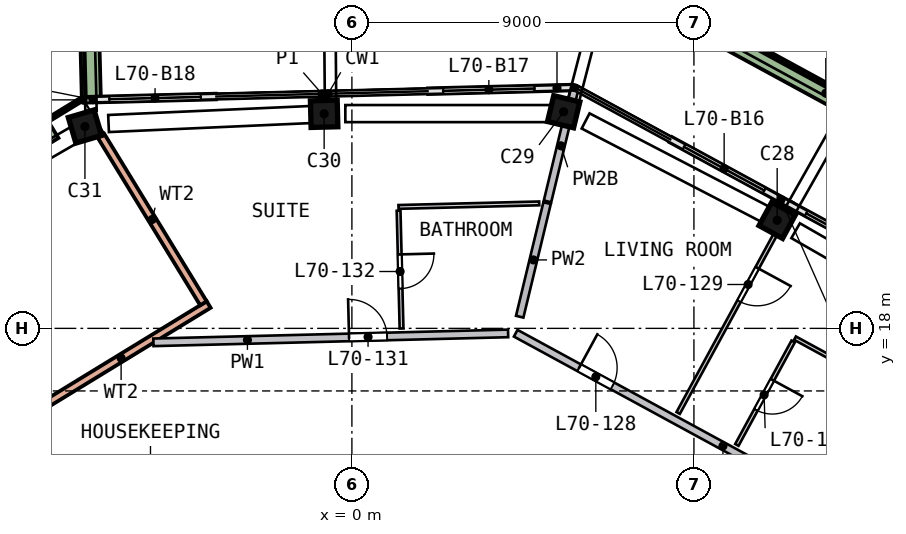
"""IFC4 building model, lengths in metres.
Left out: names, types, materials, properties, quantities, classifications, styles, units other than length and angle.
Written with IfcOpenShell. Run it as: python <this file> out.ifc"""

import sys

from ifc_helpers import new_model, si_unit, direction, frame, frame_2d, origin, origin_2d, place, context, subcontext, project, spatial, rectangle, extrude, element, fill, save


model = new_model("IFC4")
c1 = context("Model", 3, precision=1e-05, world=origin(), true_north=direction((0.0, 1.0)))
c2 = subcontext(c1, "Body", "Model", "MODEL_VIEW")
j1 = project(units=[si_unit("LENGTHUNIT", "METRE"), si_unit("PLANEANGLEUNIT", "RADIAN")], contexts=[c1])
p1 = place(None, origin())
s1 = spatial("IfcSite", under=j1, at=p1, CompositionType="ELEMENT")
p2 = place(p1, origin())
s2 = spatial("IfcBuilding", under=s1, at=p2, CompositionType="ELEMENT")
p3 = place(p2, frame((0.0, 0.0, 284.5)))
s3 = spatial("IfcBuildingStorey", under=s2, at=p3, CompositionType="ELEMENT", Elevation=284.5)
p4 = place(p3, frame((11.311, 20.78, 0.0), z_axis=(-0.099318662, 0.053005442, 0.993642907), x_axis=(-0.872612609, 0.475262413, -0.112573854)))
e1 = element("IfcColumn", 1, at=p4, inside=s3, PredefinedType="COLUMN", context=c2, shape_type="SweptSolid", body=[
    extrude(rectangle(XDim=0.7, YDim=0.7, at=origin_2d()), origin(), (0.0, 0.0, 1.0), 3.21),
])
p5 = place(p3, frame((5.709, 23.669, 0.0), z_axis=(-0.112812856, 0.026226708, 0.993270064), x_axis=(0.96552568, -0.233123432, 0.115817212)))
e2 = element("IfcColumn", 2, at=p5, inside=s3, PredefinedType="COLUMN", context=c2, shape_type="SweptSolid", body=[
    extrude(rectangle(XDim=0.7, YDim=0.7, at=origin_2d()), origin(), (0.0, 0.0, 1.0), 3.212),
])
p6 = place(p3, frame((-0.594, 23.651, 0.0), z_axis=(-0.112475484, -0.003726368, 0.993647513), x_axis=(-0.993346521, -0.024473849, -0.112533195)))
e3 = element("IfcColumn", 3, at=p6, inside=s3, PredefinedType="COLUMN", context=c2, shape_type="SweptSolid", body=[
    extrude(rectangle(XDim=0.7, YDim=0.7, at=origin_2d()), origin(), (0.0, 0.0, 1.0), 3.21),
])
p7 = place(p3, frame((-6.891, 23.353, 0.0), z_axis=(-0.110836116, -0.033676543, 0.993267963), x_axis=(0.952785536, 0.280681176, 0.115835227)))
e4 = element("IfcColumn", 4, at=p7, inside=s3, PredefinedType="COLUMN", context=c2, shape_type="SweptSolid", body=[
    extrude(rectangle(XDim=0.7, YDim=0.7, at=origin_2d()), origin(), (0.0, 0.0, 1.0), 3.212),
])
p8 = place(p3, frame((14.416, 19.687, 0.0), z_axis=(0.0, 0.0, 1.0), x_axis=(-0.878288574, 0.478130925, 0.0)))
e5 = element("IfcWall", 5, at=p8, inside=s3, PredefinedType="SOLIDWALL", context=c2, shape_type="SweptSolid", body=[
    extrude(rectangle(XDim=3.25, YDim=0.15, at=frame_2d((1.625, 0.0))), origin(), (0.0, 0.0, 1.0), 2.525),
])
p9 = place(p8, frame((0.4, 0.0, 0.0)))
e6 = element("IfcOpeningElement", 6, at=p9, cuts=e5, PredefinedType="OPENING", context=c2, shape_type="SweptSolid", body=[
    extrude(rectangle(XDim=2.4, YDim=2.4, at=frame_2d((1.2, 1.2))), frame((0.0, 0.085, 0.0), z_axis=(0.0, -1.0, 0.0), x_axis=(1.0, 0.0, 0.0)), (0.0, 0.0, 1.0), 0.17),
])
p10 = place(p3, frame((11.562, 21.241, 0.0), z_axis=(0.0, 0.0, 1.0), x_axis=(-0.878337007, 0.478041947, 0.0)))
e7 = element("IfcWall", 7, at=p10, inside=s3, PredefinedType="SOLIDWALL", context=c2, shape_type="SweptSolid", body=[
    extrude(rectangle(XDim=3.611, YDim=0.15, at=frame_2d((1.806, 0.0))), origin(), (0.0, 0.0, 1.0), 2.525),
])
p11 = place(p10, frame((0.811, 0.0, 0.0)))
e8 = element("IfcOpeningElement", 8, at=p11, cuts=e7, PredefinedType="OPENING", context=c2, shape_type="SweptSolid", body=[
    extrude(rectangle(XDim=2.4, YDim=2.4, at=frame_2d((1.2, 1.2))), frame((0.0, 0.085, 0.0), z_axis=(0.0, -1.0, 0.0), x_axis=(1.0, 0.0, 0.0)), (0.0, 0.0, 1.0), 0.17),
])
p12 = place(p3, frame((5.79, 24.336, 0.0), z_axis=(0.0, 0.0, 1.0), x_axis=(-0.999685428, -0.025080789, 0.0)))
e9 = element("IfcWall", 9, at=p12, inside=s3, PredefinedType="SOLIDWALL", context=c2, shape_type="SweptSolid", body=[
    extrude(rectangle(XDim=3.787, YDim=0.15, at=frame_2d((1.893, 0.0))), origin(), (0.0, 0.0, 1.0), 2.525),
])
p13 = place(p12, frame((0.987, 0.0, 0.0)))
e10 = element("IfcOpeningElement", 10, at=p13, cuts=e9, PredefinedType="OPENING", context=c2, shape_type="SweptSolid", body=[
    extrude(rectangle(XDim=2.4, YDim=2.4, at=frame_2d((1.2, 1.2))), frame((0.0, 0.085, 0.0), z_axis=(0.0, -1.0, 0.0), x_axis=(1.0, 0.0, 0.0)), (0.0, 0.0, 1.0), 0.17),
])
p14 = place(p3, frame((-3.58, 24.101, 0.0), z_axis=(0.0, 0.0, 1.0), x_axis=(-0.999683941, -0.025139981, 0.0)))
e11 = element("IfcWall", 11, at=p14, inside=s3, PredefinedType="SOLIDWALL", context=c2, shape_type="SweptSolid", body=[
    extrude(rectangle(XDim=3.467, YDim=0.15, at=frame_2d((1.733, 0.0))), origin(), (0.0, 0.0, 1.0), 2.525),
])
p15 = place(p14, frame((0.4, 0.0, 0.0)))
e12 = element("IfcOpeningElement", 12, at=p15, cuts=e11, PredefinedType="OPENING", context=c2, shape_type="SweptSolid", body=[
    extrude(rectangle(XDim=2.4, YDim=2.4, at=frame_2d((1.2, 1.2))), frame((0.0, 0.085, 0.0), z_axis=(0.0, -1.0, 0.0), x_axis=(1.0, 0.0, 0.0)), (0.0, 0.0, 1.0), 0.17),
])
p16 = place(p3, frame((18.278, 21.029, 0.0), z_axis=(0.0, 0.0, 1.0), x_axis=(-0.878317174, 0.478078384, 0.0)))
e13 = element("IfcWall", 13, at=p16, inside=s3, PredefinedType="SOLIDWALL", context=c2, shape_type="SweptSolid", body=[
    extrude(rectangle(XDim=13.223, YDim=0.5, at=frame_2d((6.612, 0.0))), origin(), (0.0, 0.0, 1.0), 0.7),
])
p17 = place(p3, frame((-6.926, 26.793, 0.0), z_axis=(0.0, 0.0, 1.0), x_axis=(0.025148138, -0.999683736, 0.0)))
e14 = element("IfcWall", 14, at=p17, inside=s3, PredefinedType="SOLIDWALL", context=c2, shape_type="SweptSolid", body=[
    extrude(rectangle(XDim=2.699, YDim=0.5, at=frame_2d((1.349, 0.0))), origin(), (0.0, 0.0, 1.0), 0.7),
])
p18 = place(p3, frame((-14.861, 11.846, 0.0), z_axis=(0.0, 0.0, 1.0), x_axis=(0.853179687, 0.521617121, 0.0)))
e15 = element("IfcWall", 15, at=p18, inside=s3, PredefinedType="SOLIDWALL", context=c2, shape_type="SweptSolid", body=[
    extrude(rectangle(XDim=13.0, YDim=0.2, at=frame_2d((6.5, 0.0))), origin(), (0.0, 0.0, 1.0), 3.19),
])
p19 = place(p18, frame((5.6, 0.0, 0.0)))
e16 = element("IfcOpeningElement", 16, at=p19, cuts=e15, PredefinedType="OPENING", context=c2, shape_type="SweptSolid", body=[
    extrude(rectangle(XDim=1.8, YDim=2.4, at=frame_2d((0.9, 1.2))), frame((0.0, 0.11, 0.0), z_axis=(0.0, -1.0, 0.0), x_axis=(1.0, 0.0, 0.0)), (0.0, 0.0, 1.0), 0.22),
])
p20 = place(p3, frame((-6.604, 23.071, 0.0), z_axis=(0.0, 0.0, 1.0), x_axis=(0.521623821, -0.853175591, 0.0)))
e17 = element("IfcWall", 17, at=p20, inside=s3, PredefinedType="SOLIDWALL", context=c2, shape_type="SweptSolid", body=[
    extrude(rectangle(XDim=5.17, YDim=0.2, at=frame_2d((2.585, 0.0))), origin(), (0.0, 0.0, 1.0), 3.19),
])
p21 = place(p3, frame((-7.15, 24.003, 0.0), z_axis=(0.0, 0.0, 1.0), x_axis=(-0.853186879, -0.521605358, 0.0)))
e18 = element("IfcWall", 18, at=p21, inside=s3, PredefinedType="SOLIDWALL", context=c2, shape_type="SweptSolid", body=[
    extrude(rectangle(XDim=12.84, YDim=0.1, at=frame_2d((6.42, 0.0))), origin(), (0.0, 0.0, 1.0), 0.7),
])
p22 = place(p3, frame((-7.852, 23.222, 0.0), z_axis=(0.0, 0.0, 1.0), x_axis=(-0.853196702, -0.521589289, 0.0)))
e19 = element("IfcWall", 19, at=p22, inside=s3, PredefinedType="SOLIDWALL", context=c2, shape_type="SweptSolid", body=[
    extrude(rectangle(XDim=4.963, YDim=0.5, at=frame_2d((2.481, 0.0))), origin(), (0.0, 0.0, 1.0), 0.7),
])
p23 = place(p3, frame((-5.223, 17.633, 0.0), z_axis=(0.0, 0.0, 1.0), x_axis=(0.999684224, 0.025128732, 0.0)))
e20 = element("IfcWall", 20, at=p23, inside=s3, PredefinedType="SOLIDWALL", context=c2, shape_type="SweptSolid", body=[
    extrude(rectangle(XDim=9.337, YDim=0.2, at=frame_2d((4.668, 0.0))), origin(), (0.0, 0.0, 1.0), 3.19),
])
p24 = place(p23, frame((5.15, 0.0, 0.0)))
e21 = element("IfcOpeningElement", 21, at=p24, cuts=e20, PredefinedType="OPENING", context=c2, shape_type="SweptSolid", body=[
    extrude(rectangle(XDim=1.0, YDim=2.1, at=frame_2d((0.5, 1.05))), frame((0.0, 0.11, 0.0), z_axis=(0.0, -1.0, 0.0), x_axis=(1.0, 0.0, 0.0)), (0.0, 0.0, 1.0), 0.22),
])
p25 = place(p3, frame((4.311, 17.872, 0.0), z_axis=(0.0, 0.0, 1.0), x_axis=(0.87831385, -0.478084491, 0.0)))
e22 = element("IfcWall", 22, at=p25, inside=s3, PredefinedType="SOLIDWALL", context=c2, shape_type="SweptSolid", body=[
    extrude(rectangle(XDim=9.317, YDim=0.2, at=frame_2d((4.658, 0.0))), origin(), (0.0, 0.0, 1.0), 3.19),
])
p26 = place(p25, frame((1.9, 0.0, 0.0)))
e23 = element("IfcOpeningElement", 23, at=p26, cuts=e22, PredefinedType="OPENING", context=c2, shape_type="SweptSolid", body=[
    extrude(rectangle(XDim=1.0, YDim=2.1, at=frame_2d((0.5, 1.05))), frame((0.0, 0.11, 0.0), z_axis=(0.0, -1.0, 0.0), x_axis=(1.0, 0.0, 0.0)), (0.0, 0.0, 1.0), 0.22),
])
p27 = place(p3, frame((4.415, 18.307, 0.0), z_axis=(0.0, 0.0, 1.0), x_axis=(0.234456847, 0.972126528, 0.0)))
e24 = element("IfcWall", 24, at=p27, inside=s3, PredefinedType="SOLIDWALL", context=c2, shape_type="SweptSolid", body=[
    extrude(rectangle(XDim=3.075, YDim=0.2, at=frame_2d((1.538, 0.0))), origin(), (0.0, 0.0, 1.0), 3.19),
])
p28 = place(p3, frame((5.147, 21.341, 0.0), z_axis=(0.0, 0.0, 1.0), x_axis=(0.234458255, 0.972126189, 0.0)))
e25 = element("IfcWall", 25, at=p28, inside=s3, PredefinedType="SOLIDWALL", context=c2, shape_type="SweptSolid", body=[
    extrude(rectangle(XDim=3.011, YDim=0.2, at=frame_2d((1.506, 0.0))), origin(), (0.0, 0.0, 1.0), 2.69),
])
p29 = place(p3, frame((1.229, 21.096, 0.0), z_axis=(0.0, 0.0, 1.0), x_axis=(0.025122051, -0.999684391, 0.0)))
e26 = element("IfcWall", 26, at=p29, inside=s3, PredefinedType="PARTITIONING", context=c2, shape_type="SweptSolid", body=[
    extrude(rectangle(XDim=3.1, YDim=0.1, at=frame_2d((1.55, 0.0))), origin(), (0.0, 0.0, 1.0), 3.19),
])
p30 = place(p29, frame((1.15, 0.0, 0.0)))
e27 = element("IfcOpeningElement", 27, at=p30, cuts=e26, PredefinedType="OPENING", context=c2, shape_type="SweptSolid", body=[
    extrude(rectangle(XDim=0.9, YDim=2.1, at=frame_2d((0.45, 1.05))), frame((0.0, 0.06, 0.0), z_axis=(0.0, -1.0, 0.0), x_axis=(1.0, 0.0, 0.0)), (0.0, 0.0, 1.0), 0.12),
])
p31 = place(p3, frame((1.226, 21.196, 0.0), z_axis=(0.0, 0.0, 1.0), x_axis=(0.999684634, 0.025112405, 0.0)))
e28 = element("IfcWall", 28, at=p31, inside=s3, PredefinedType="PARTITIONING", context=c2, shape_type="SweptSolid", body=[
    extrude(rectangle(XDim=3.704, YDim=0.1, at=frame_2d((1.852, 0.0))), origin(), (0.0, 0.0, 1.0), 3.19),
])
p32 = place(p3, frame((11.526, 21.175, 0.0), z_axis=(0.0, 0.0, 1.0), x_axis=(-0.478081504, -0.878315476, 0.0)))
e29 = element("IfcWall", 29, at=p32, inside=s3, PredefinedType="PARTITIONING", context=c2, shape_type="SweptSolid", body=[
    extrude(rectangle(XDim=6.15, YDim=0.1, at=frame_2d((3.075, 0.0))), origin(), (0.0, 0.0, 1.0), 3.19),
])
p33 = place(p32, frame((1.8, 0.0, 0.0)))
e30 = element("IfcOpeningElement", 30, at=p33, cuts=e29, PredefinedType="OPENING", context=c2, shape_type="SweptSolid", body=[
    extrude(rectangle(XDim=1.0, YDim=2.1, at=frame_2d((0.5, 1.05))), frame((0.0, 0.06, 0.0), z_axis=(0.0, -1.0, 0.0), x_axis=(1.0, 0.0, 0.0)), (0.0, 0.0, 1.0), 0.12),
])
p34 = place(p3, frame((11.612, 17.655, 0.0), z_axis=(0.0, 0.0, 1.0), x_axis=(-0.478068361, -0.87832263, 0.0)))
e31 = element("IfcWall", 31, at=p34, inside=s3, PredefinedType="PARTITIONING", context=c2, shape_type="SweptSolid", body=[
    extrude(rectangle(XDim=3.1, YDim=0.1, at=frame_2d((1.55, 0.0))), origin(), (0.0, 0.0, 1.0), 3.19),
])
p35 = place(p34, frame((1.15, 0.0, 0.0)))
e32 = element("IfcOpeningElement", 32, at=p35, cuts=e31, PredefinedType="OPENING", context=c2, shape_type="SweptSolid", body=[
    extrude(rectangle(XDim=0.9, YDim=2.1, at=frame_2d((0.45, 1.05))), frame((0.0, 0.06, 0.0), z_axis=(0.0, -1.0, 0.0), x_axis=(1.0, 0.0, 0.0)), (0.0, 0.0, 1.0), 0.12),
])
p36 = place(p3, frame((14.913, 15.972, 0.0), z_axis=(0.0, 0.0, 1.0), x_axis=(-0.878330978, 0.478053023, 0.0)))
e33 = element("IfcWall", 33, at=p36, inside=s3, PredefinedType="PARTITIONING", context=c2, shape_type="SweptSolid", body=[
    extrude(rectangle(XDim=3.704, YDim=0.1, at=frame_2d((1.852, 0.0))), origin(), (0.0, 0.0, 1.0), 3.19),
])
p37 = place(p9, origin())
e34 = element("IfcDoor", 34, at=p37, inside=s3, OperationType="SLIDING_TO_RIGHT", PredefinedType="DOOR", context=c2, shape_type="SweptSolid", body=[
    extrude(rectangle(XDim=2.4, YDim=2.4, at=frame_2d((1.2, 1.2))), frame((0.0, 0.025, 0.0), z_axis=(0.0, -1.0, 0.0), x_axis=(1.0, 0.0, 0.0)), (0.0, 0.0, 1.0), 0.05),
])
fill(e6, e34)
p38 = place(p11, origin())
e35 = element("IfcDoor", 35, at=p38, inside=s3, OperationType="SLIDING_TO_LEFT", PredefinedType="DOOR", context=c2, shape_type="SweptSolid", body=[
    extrude(rectangle(XDim=2.4, YDim=2.4, at=frame_2d((1.2, 1.2))), frame((0.0, 0.025, 0.0), z_axis=(0.0, -1.0, 0.0), x_axis=(1.0, 0.0, 0.0)), (0.0, 0.0, 1.0), 0.05),
])
fill(e8, e35)
p39 = place(p13, origin())
e36 = element("IfcDoor", 36, at=p39, inside=s3, OperationType="SLIDING_TO_LEFT", PredefinedType="DOOR", context=c2, shape_type="SweptSolid", body=[
    extrude(rectangle(XDim=2.4, YDim=2.4, at=frame_2d((1.2, 1.2))), frame((0.0, 0.025, 0.0), z_axis=(0.0, -1.0, 0.0), x_axis=(1.0, 0.0, 0.0)), (0.0, 0.0, 1.0), 0.05),
])
fill(e10, e36)
p40 = place(p15, origin())
e37 = element("IfcDoor", 37, at=p40, inside=s3, OperationType="SLIDING_TO_RIGHT", PredefinedType="DOOR", context=c2, shape_type="SweptSolid", body=[
    extrude(rectangle(XDim=2.4, YDim=2.4, at=frame_2d((1.2, 1.2))), frame((0.0, 0.025, 0.0), z_axis=(0.0, -1.0, 0.0), x_axis=(1.0, 0.0, 0.0)), (0.0, 0.0, 1.0), 0.05),
])
fill(e12, e37)
p41 = place(p26, origin())
e38 = element("IfcDoor", 38, at=p41, inside=s3, OperationType="SINGLE_SWING_LEFT", PredefinedType="DOOR", context=c2, shape_type="SweptSolid", body=[
    extrude(rectangle(XDim=1.0, YDim=2.1, at=frame_2d((0.5, 1.05))), frame((0.0, 0.025, 0.0), z_axis=(0.0, -1.0, 0.0), x_axis=(1.0, 0.0, 0.0)), (0.0, 0.0, 1.0), 0.05),
])
fill(e23, e38)
p42 = place(p33, origin())
e39 = element("IfcDoor", 39, at=p42, inside=s3, OperationType="SINGLE_SWING_LEFT", PredefinedType="DOOR", context=c2, shape_type="SweptSolid", body=[
    extrude(rectangle(XDim=1.0, YDim=2.1, at=frame_2d((0.5, 1.05))), frame((0.0, 0.025, 0.0), z_axis=(0.0, -1.0, 0.0), x_axis=(1.0, 0.0, 0.0)), (0.0, 0.0, 1.0), 0.05),
])
fill(e30, e39)
p43 = place(p35, origin())
e40 = element("IfcDoor", 40, at=p43, inside=s3, OperationType="SINGLE_SWING_LEFT", PredefinedType="DOOR", context=c2, shape_type="SweptSolid", body=[
    extrude(rectangle(XDim=0.9, YDim=2.1, at=frame_2d((0.45, 1.05))), frame((0.0, 0.025, 0.0), z_axis=(0.0, -1.0, 0.0), x_axis=(1.0, 0.0, 0.0)), (0.0, 0.0, 1.0), 0.05),
])
fill(e32, e40)
p44 = place(p24, origin())
e41 = element("IfcDoor", 41, at=p44, inside=s3, OperationType="SINGLE_SWING_LEFT", PredefinedType="DOOR", context=c2, shape_type="SweptSolid", body=[
    extrude(rectangle(XDim=1.0, YDim=2.1, at=frame_2d((0.5, 1.05))), frame((0.0, 0.025, 0.0), z_axis=(0.0, -1.0, 0.0), x_axis=(1.0, 0.0, 0.0)), (0.0, 0.0, 1.0), 0.05),
])
fill(e21, e41)
p45 = place(p30, origin())
e42 = element("IfcDoor", 42, at=p45, inside=s3, OperationType="SINGLE_SWING_LEFT", PredefinedType="DOOR", context=c2, shape_type="SweptSolid", body=[
    extrude(rectangle(XDim=0.9, YDim=2.1, at=frame_2d((0.45, 1.05))), frame((0.0, 0.025, 0.0), z_axis=(0.0, -1.0, 0.0), x_axis=(1.0, 0.0, 0.0)), (0.0, 0.0, 1.0), 0.05),
])
fill(e27, e42)
save(model, sys.argv[1])
